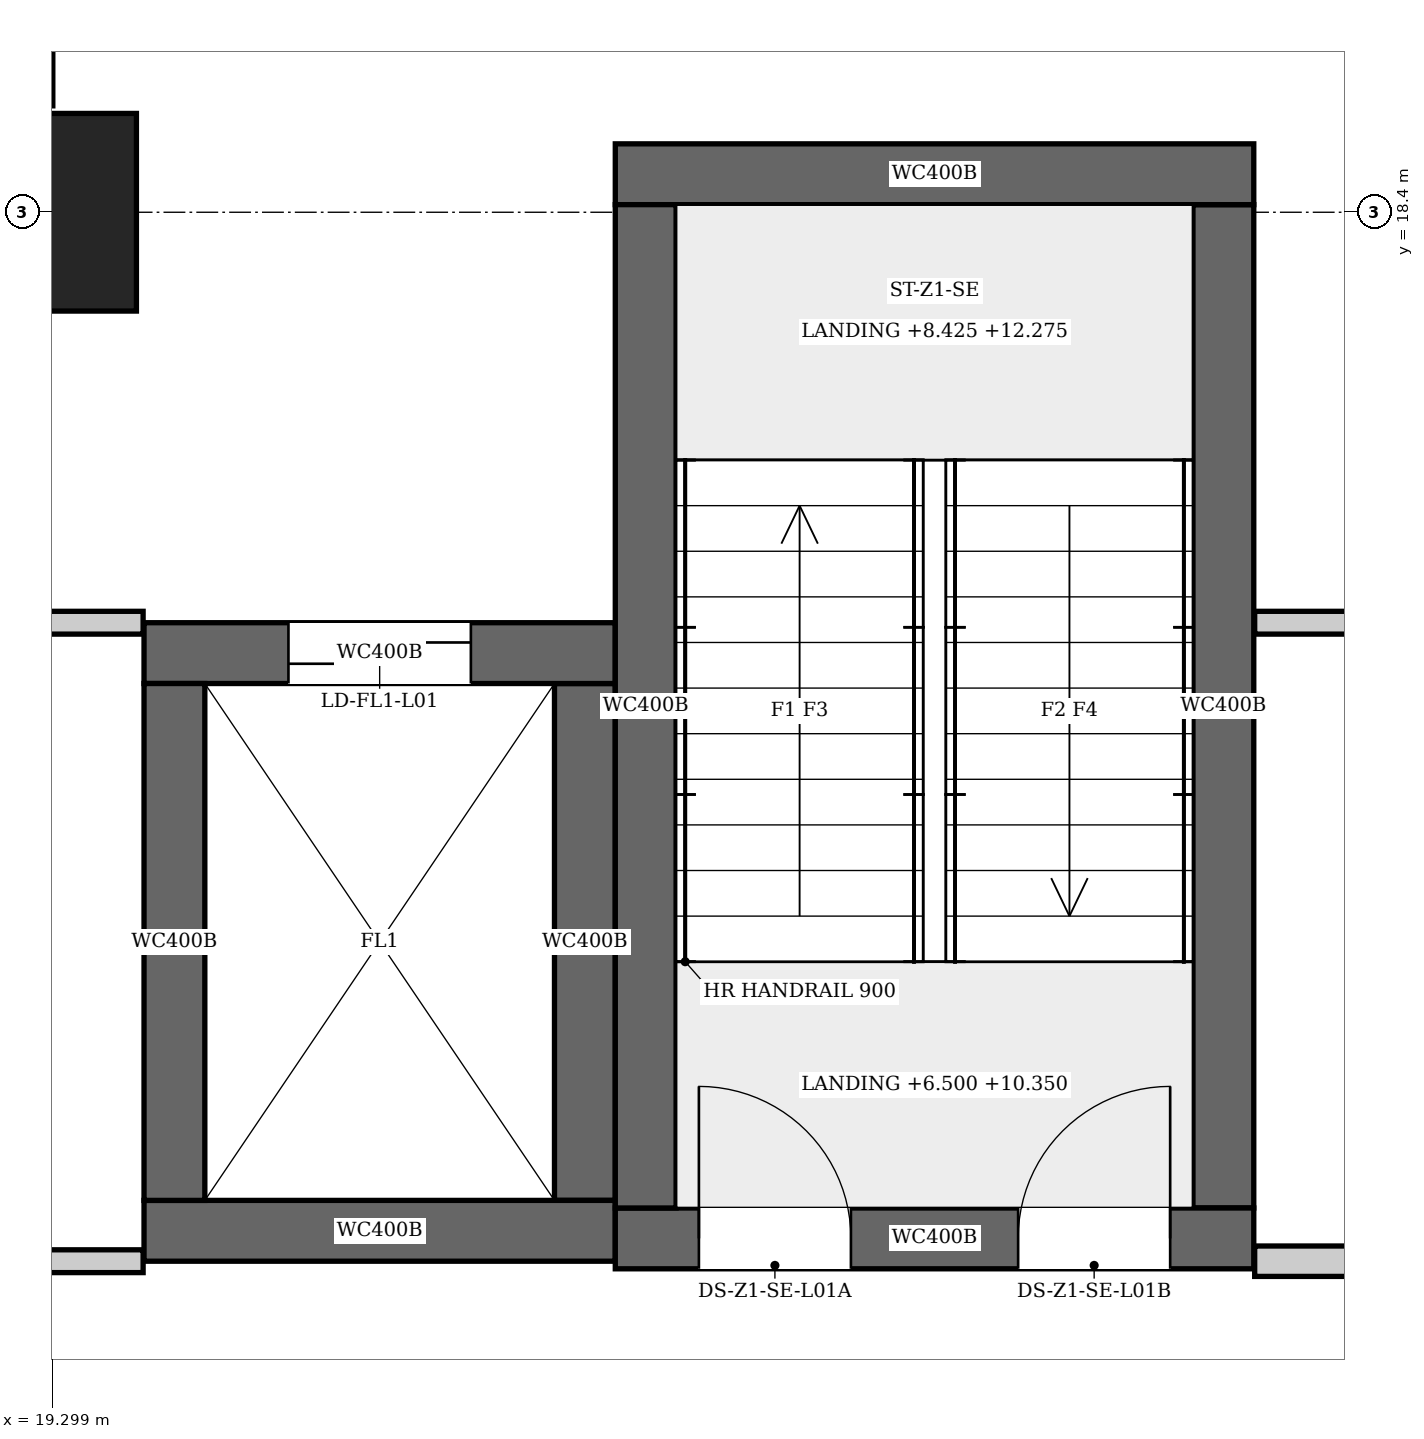
"""IFC4 building model, lengths in metres.
Left out: names, types, materials, properties, quantities, classifications, styles, units other than length and angle.
Written with IfcOpenShell. Run it as: python <this file> out.ifc"""

import sys

from ifc_helpers import new_model, si_unit, direction, frame, frame_2d, origin, origin_2d, place, context, subcontext, project, spatial, rectangle, extrude, element, fill, save


model = new_model("IFC4")
c1 = context("Model", 3, precision=1e-05, world=origin(), true_north=direction((0.0, 1.0)))
c2 = subcontext(c1, "Body", "Model", "MODEL_VIEW")
j1 = project(units=[si_unit("LENGTHUNIT", "METRE"), si_unit("PLANEANGLEUNIT", "RADIAN")], contexts=[c1])
p1 = place(None, origin())
s1 = spatial("IfcSite", under=j1, at=p1, CompositionType="ELEMENT")
p2 = place(p1, origin())
s2 = spatial("IfcBuilding", under=s1, at=p2, CompositionType="ELEMENT")
p3 = place(p2, frame((0.0, 0.0, 6.5)))
s3 = spatial("IfcBuildingStorey", under=s2, at=p3, CompositionType="ELEMENT", Elevation=6.5)
p4 = place(p3, frame((23.0, 11.65, 0.0), z_axis=(0.0, 0.0, 1.0), x_axis=(1.0, 0.0, 0.0)))
e1 = element("IfcWall", 1, at=p4, inside=s3, PredefinedType="SHEAR", context=c2, shape_type="SweptSolid", body=[
    extrude(rectangle(XDim=4.2, YDim=0.4, at=frame_2d((2.1, 0.0))), origin(), (0.0, 0.0, 1.0), 7.7),
])
p5 = place(p4, frame((0.55, 0.0, 0.0)))
e2 = element("IfcOpeningElement", 2, at=p5, cuts=e1, PredefinedType="OPENING", context=c2, shape_type="SweptSolid", body=[
    extrude(rectangle(XDim=1.0, YDim=2.1, at=frame_2d((0.5, 1.05))), frame((0.0, 0.21, 0.0), z_axis=(0.0, -1.0, 0.0), x_axis=(1.0, 0.0, 0.0)), (0.0, 0.0, 1.0), 0.42),
])
p6 = place(p4, frame((2.65, 0.0, 0.0)))
e3 = element("IfcOpeningElement", 3, at=p6, cuts=e1, PredefinedType="OPENING", context=c2, shape_type="SweptSolid", body=[
    extrude(rectangle(XDim=1.0, YDim=2.1, at=frame_2d((0.5, 1.05))), frame((0.0, 0.21, 0.0), z_axis=(0.0, -1.0, 0.0), x_axis=(1.0, 0.0, 0.0)), (0.0, 0.0, 1.0), 0.42),
])
p7 = place(p3, frame((23.0, 18.65, 0.0), z_axis=(0.0, 0.0, 1.0), x_axis=(1.0, 0.0, 0.0)))
e4 = element("IfcWall", 4, at=p7, inside=s3, PredefinedType="SHEAR", context=c2, shape_type="SweptSolid", body=[
    extrude(rectangle(XDim=4.2, YDim=0.4, at=frame_2d((2.1, 0.0))), origin(), (0.0, 0.0, 1.0), 7.7),
])
for number, where, z_axis, x_axis in (
    (5, (23.2, 11.85, 0.0), (0.0, 0.0, 1.0), (0.0, 1.0, 0.0)),
    (6, (27.0, 11.85, 0.0), (0.0, 0.0, 1.0), (0.0, 1.0, 0.0)),
):
    element("IfcWall", number, at=place(p3, frame(where, z_axis=z_axis, x_axis=x_axis)), inside=s3, PredefinedType="SHEAR", context=c2, shape_type="SweptSolid", body=[
        extrude(rectangle(XDim=6.6, YDim=0.4, at=frame_2d((3.3, 0.0))), origin(), (0.0, 0.0, 1.0), 7.7),
    ])
p8 = place(p3, frame((19.9, 11.7, 0.0), z_axis=(0.0, 0.0, 1.0), x_axis=(1.0, 0.0, 0.0)))
e7 = element("IfcWall", 7, at=p8, inside=s3, PredefinedType="SHEAR", context=c2, shape_type="SweptSolid", body=[
    extrude(rectangle(XDim=3.1, YDim=0.4, at=frame_2d((1.55, 0.0))), origin(), (0.0, 0.0, 1.0), 7.7),
])
p9 = place(p3, frame((19.9, 15.5, 0.0), z_axis=(0.0, 0.0, 1.0), x_axis=(1.0, 0.0, 0.0)))
e8 = element("IfcWall", 8, at=p9, inside=s3, PredefinedType="SHEAR", context=c2, shape_type="SweptSolid", body=[
    extrude(rectangle(XDim=3.1, YDim=0.4, at=frame_2d((1.55, 0.0))), origin(), (0.0, 0.0, 1.0), 7.7),
])
p10 = place(p9, frame((0.95, 0.0, 0.0)))
e9 = element("IfcOpeningElement", 9, at=p10, cuts=e8, PredefinedType="OPENING", context=c2, shape_type="SweptSolid", body=[
    extrude(rectangle(XDim=1.2, YDim=2.1, at=frame_2d((0.6, 1.05))), frame((0.0, 0.21, 0.0), z_axis=(0.0, -1.0, 0.0), x_axis=(1.0, 0.0, 0.0)), (0.0, 0.0, 1.0), 0.42),
])
for number, where, z_axis, x_axis in (
    (10, (20.1, 11.9, 0.0), (0.0, 0.0, 1.0), (0.0, 1.0, 0.0)),
    (11, (22.8, 11.9, 0.0), (0.0, 0.0, 1.0), (0.0, 1.0, 0.0)),
):
    element("IfcWall", number, at=place(p3, frame(where, z_axis=z_axis, x_axis=x_axis)), inside=s3, PredefinedType="SHEAR", context=c2, shape_type="SweptSolid", body=[
        extrude(rectangle(XDim=3.4, YDim=0.4, at=frame_2d((1.7, 0.0))), origin(), (0.0, 0.0, 1.0), 7.7),
    ])
p11 = place(p3, frame((19.2, 18.4, 0.0), z_axis=(0.0, 0.0, 1.0), x_axis=(1.0, 0.0, 0.0)))
e12 = element("IfcColumn", 12, at=p11, inside=s3, PredefinedType="COLUMN", context=c2, shape_type="SweptSolid", body=[
    extrude(rectangle(XDim=1.3, YDim=1.3, at=origin_2d()), origin(), (0.0, 0.0, 1.0), 7.7),
])
p12 = place(p3, frame((10.325, 11.5, 0.0), z_axis=(0.0, 0.0, 1.0), x_axis=(1.0, 0.0, 0.0)))
e13 = element("IfcWall", 13, at=p12, inside=s3, PredefinedType="PARTITIONING", context=c2, shape_type="SweptSolid", body=[
    extrude(rectangle(XDim=9.569, YDim=0.15, at=frame_2d((4.785, 0.0))), origin(), (0.0, 0.0, 1.0), 7.35),
])
p13 = place(p3, frame((16.206, 15.7, 0.0), z_axis=(0.0, 0.0, 1.0), x_axis=(1.0, 0.0, 0.0)))
e14 = element("IfcWall", 14, at=p13, inside=s3, PredefinedType="PARTITIONING", context=c2, shape_type="SweptSolid", body=[
    extrude(rectangle(XDim=3.688, YDim=0.15, at=frame_2d((1.844, 0.0))), origin(), (0.0, 0.0, 1.0), 7.35),
])
p14 = place(p3, frame((27.206, 11.5, 0.0), z_axis=(0.0, 0.0, 1.0), x_axis=(1.0, 0.0, 0.0)))
e15 = element("IfcWall", 15, at=p14, inside=s3, PredefinedType="PARTITIONING", context=c2, shape_type="SweptSolid", body=[
    extrude(rectangle(XDim=26.494, YDim=0.2, at=frame_2d((13.247, 0.0))), origin(), (0.0, 0.0, 1.0), 7.35),
])
p15 = place(p14, frame((15.494, 0.0, 0.0)))
e16 = element("IfcOpeningElement", 16, at=p15, cuts=e15, PredefinedType="OPENING", context=c2, shape_type="SweptSolid", body=[
    extrude(rectangle(XDim=1.0, YDim=2.1, at=frame_2d((0.5, 1.05))), frame((0.0, 0.11, 0.0), z_axis=(0.0, -1.0, 0.0), x_axis=(1.0, 0.0, 0.0)), (0.0, 0.0, 1.0), 0.22),
])
p16 = place(p14, frame((23.059, 0.0, 0.0)))
e17 = element("IfcOpeningElement", 17, at=p16, cuts=e15, PredefinedType="OPENING", context=c2, shape_type="SweptSolid", body=[
    extrude(rectangle(XDim=1.0, YDim=2.1, at=frame_2d((0.5, 1.05))), frame((0.0, 0.11, 0.0), z_axis=(0.0, -1.0, 0.0), x_axis=(1.0, 0.0, 0.0)), (0.0, 0.0, 1.0), 0.22),
])
p17 = place(p3, frame((27.206, 15.7, 0.0), z_axis=(0.0, 0.0, 1.0), x_axis=(1.0, 0.0, 0.0)))
e18 = element("IfcWall", 18, at=p17, inside=s3, PredefinedType="PARTITIONING", context=c2, shape_type="SweptSolid", body=[
    extrude(rectangle(XDim=1.869, YDim=0.15, at=frame_2d((0.935, 0.0))), origin(), (0.0, 0.0, 1.0), 7.35),
])
p18 = place(p5, origin())
e19 = element("IfcDoor", 19, at=p18, inside=s3, OperationType="SINGLE_SWING_RIGHT", PredefinedType="DOOR", context=c2, shape_type="SweptSolid", body=[
    extrude(rectangle(XDim=1.0, YDim=2.1, at=frame_2d((0.5, 1.05))), frame((0.0, 0.025, 0.0), z_axis=(0.0, -1.0, 0.0), x_axis=(1.0, 0.0, 0.0)), (0.0, 0.0, 1.0), 0.05),
])
fill(e2, e19)
p19 = place(p6, origin())
e20 = element("IfcDoor", 20, at=p19, inside=s3, OperationType="SINGLE_SWING_LEFT", PredefinedType="DOOR", context=c2, shape_type="SweptSolid", body=[
    extrude(rectangle(XDim=1.0, YDim=2.1, at=frame_2d((0.5, 1.05))), frame((0.0, 0.025, 0.0), z_axis=(0.0, -1.0, 0.0), x_axis=(1.0, 0.0, 0.0)), (0.0, 0.0, 1.0), 0.05),
])
fill(e3, e20)
p20 = place(p10, origin())
e21 = element("IfcDoor", 21, at=p20, inside=s3, OperationType="DOUBLE_DOOR_SLIDING", PredefinedType="DOOR", context=c2, shape_type="SweptSolid", body=[
    extrude(rectangle(XDim=1.2, YDim=2.1, at=frame_2d((0.6, 1.05))), frame((0.0, 0.025, 0.0), z_axis=(0.0, -1.0, 0.0), x_axis=(1.0, 0.0, 0.0)), (0.0, 0.0, 1.0), 0.05),
])
fill(e9, e21)
save(model, sys.argv[1])
